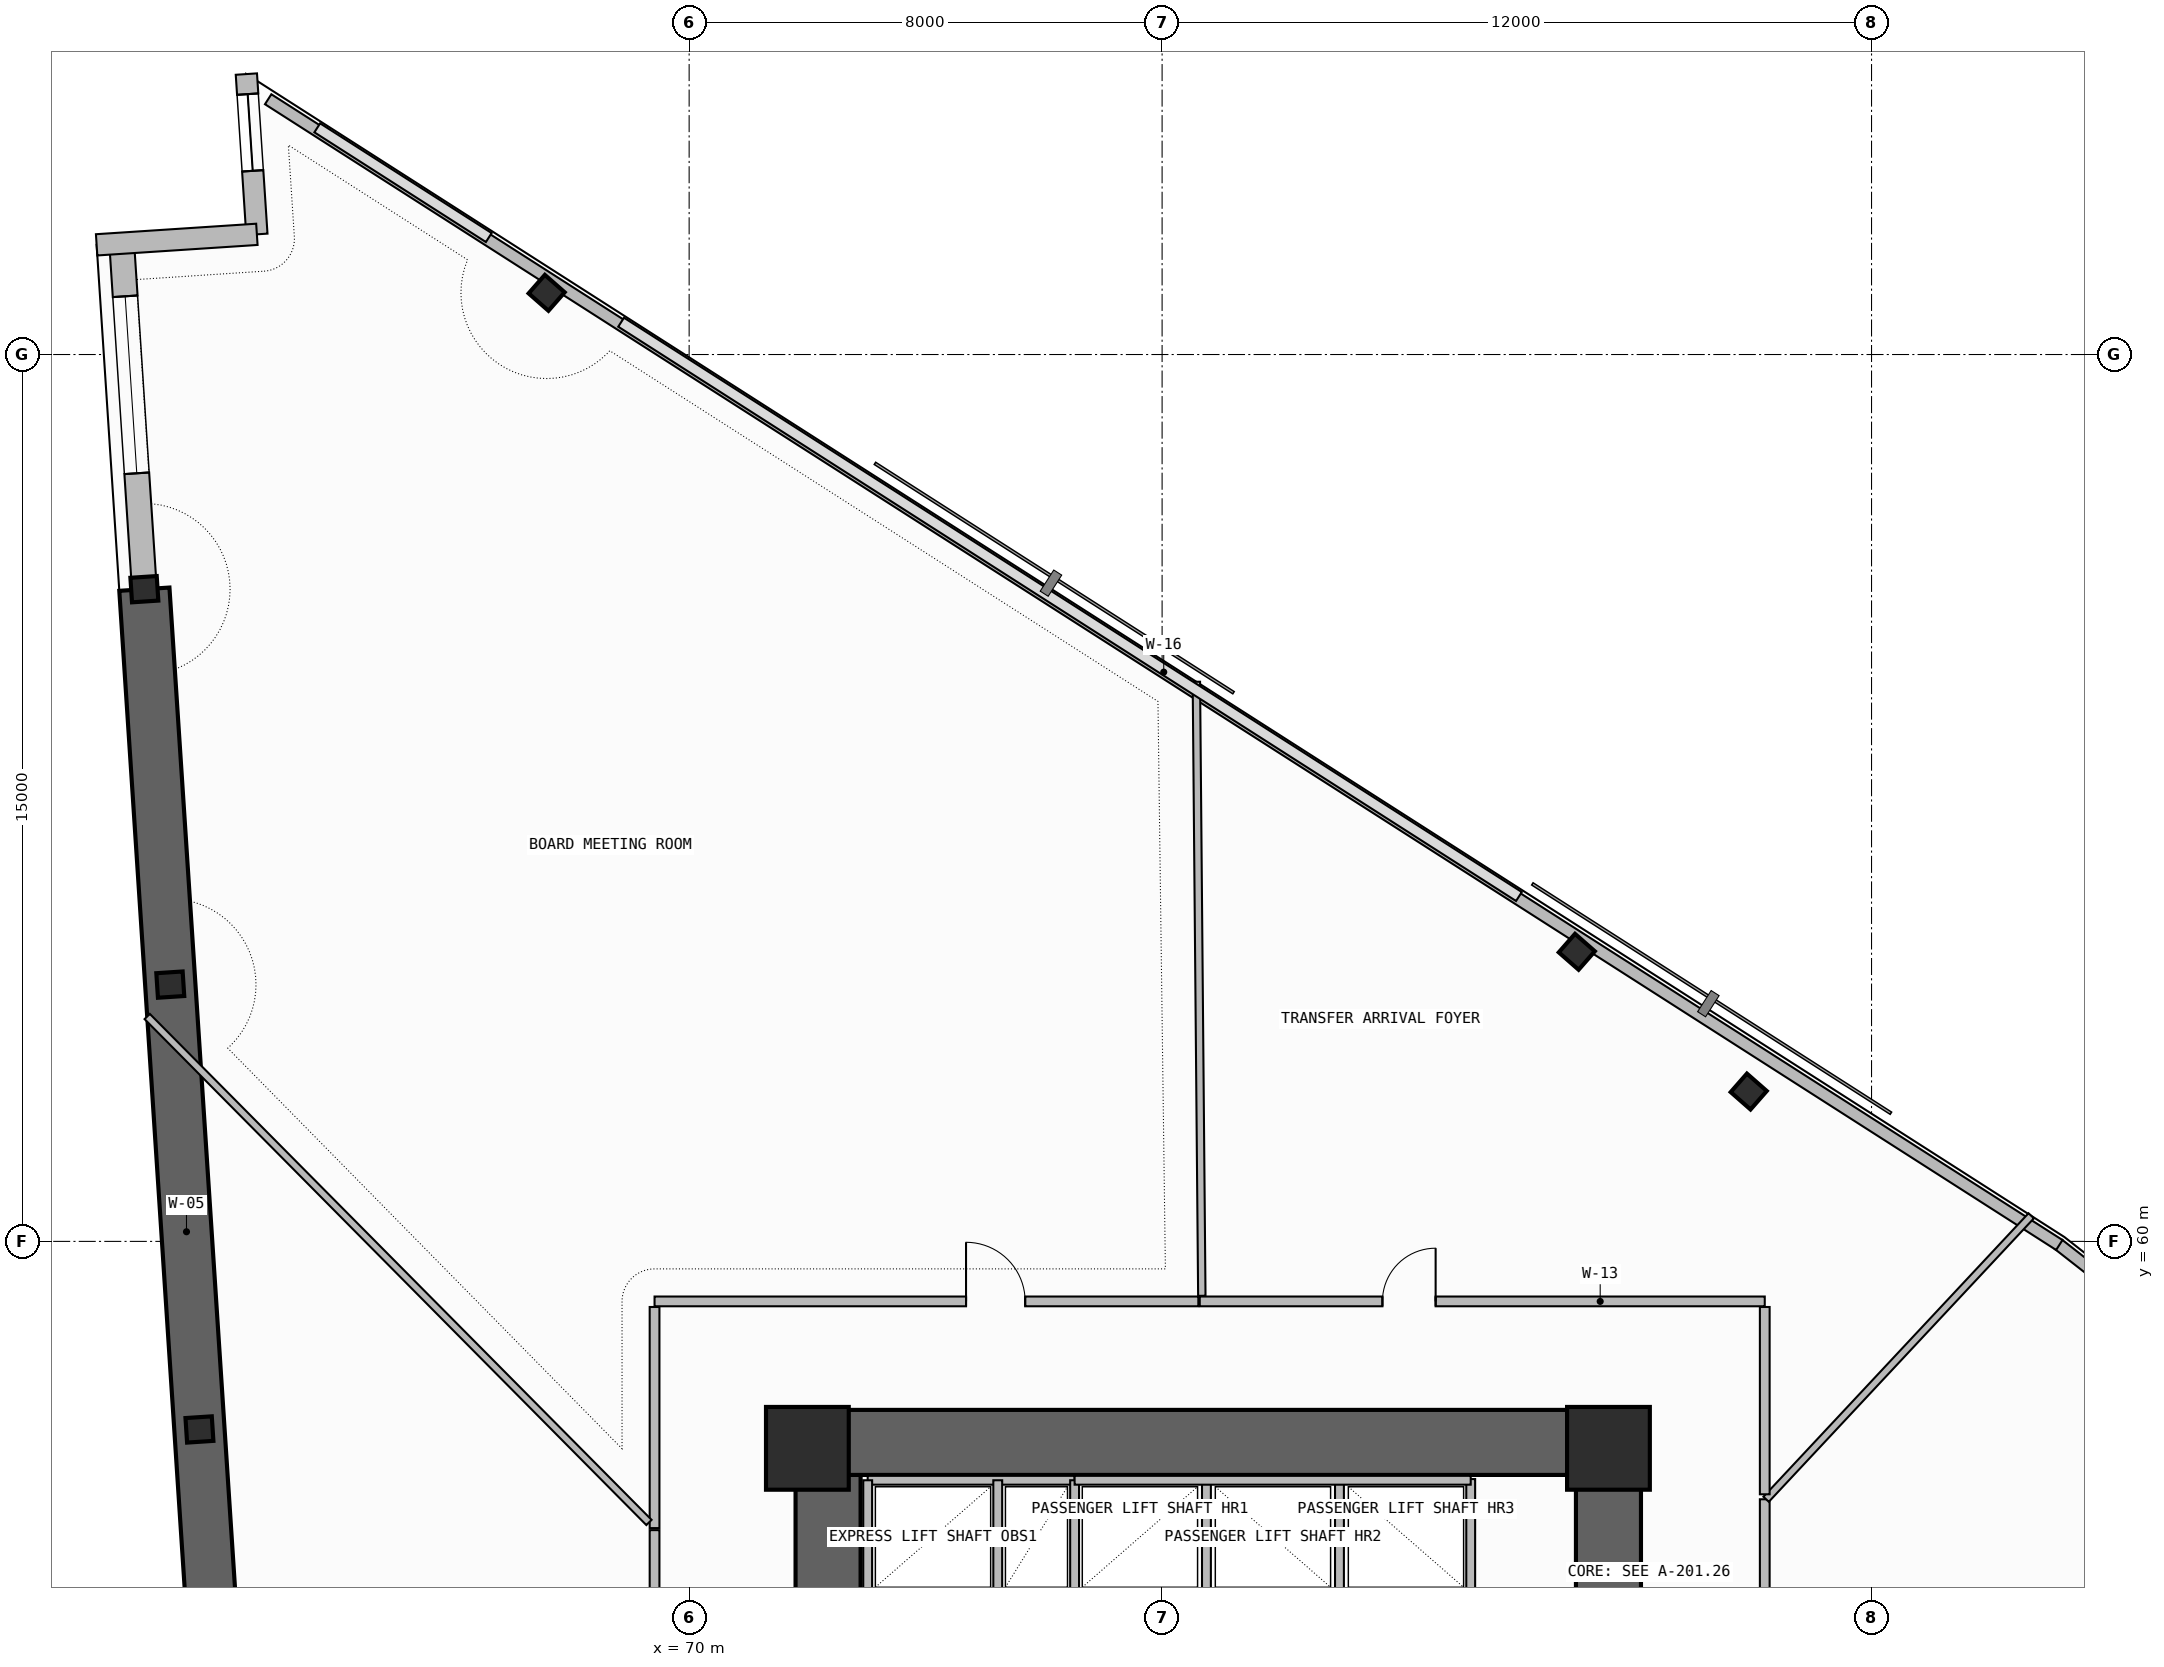
"""IFC4 building model, lengths in metres.
Left out: names, types, materials, properties, quantities, classifications, styles, units other than length and angle.
Written with IfcOpenShell. Run it as: python <this file> out.ifc"""

import sys

from ifc_helpers import new_model, si_unit, direction, frame, frame_2d, origin, origin_2d, place, context, subcontext, project, spatial, rectangle, i_section, extrude, element, fill, save


model = new_model("IFC4")
c1 = context("Model", 3, precision=1e-05, world=origin(), true_north=direction((0.0, 1.0)))
c2 = subcontext(c1, "Body", "Model", "MODEL_VIEW")
j1 = project(units=[si_unit("LENGTHUNIT", "METRE"), si_unit("PLANEANGLEUNIT", "RADIAN")], contexts=[c1])
p1 = place(None, origin())
s1 = spatial("IfcSite", under=j1, at=p1, CompositionType="ELEMENT")
p2 = place(p1, origin())
s2 = spatial("IfcBuilding", under=s1, at=p2, CompositionType="ELEMENT")
p3 = place(p2, frame((0.0, 0.0, 92.1)))
s3 = spatial("IfcBuildingStorey", under=s2, at=p3, CompositionType="ELEMENT", Elevation=92.1)
p4 = place(p3, frame((72.35, 43.35, -0.26), z_axis=(0.0, 0.0, 1.0), x_axis=(0.0, 1.0, 0.0)))
e1 = element("IfcWall", 1, at=p4, inside=s3, PredefinedType="SHEAR", context=c2, shape_type="SweptSolid", body=[
    extrude(rectangle(XDim=12.7, YDim=1.1, at=frame_2d((6.35, 0.0))), origin(), (0.0, 0.0, 1.0), 3.46),
])
p5 = place(p4, frame((1.35, 0.0, 0.26)))
e2 = element("IfcOpeningElement", 2, at=p5, cuts=e1, PredefinedType="OPENING", context=c2, shape_type="SweptSolid", body=[
    extrude(rectangle(XDim=1.2, YDim=2.2, at=frame_2d((0.6, 1.1))), frame((0.0, 0.56, 0.0), z_axis=(0.0, -1.0, 0.0), x_axis=(1.0, 0.0, 0.0)), (0.0, 0.0, 1.0), 1.12),
])
p6 = place(p3, frame((71.8, 56.6, -0.26), z_axis=(0.0, 0.0, 1.0), x_axis=(1.0, 0.0, 0.0)))
e3 = element("IfcWall", 3, at=p6, inside=s3, PredefinedType="SHEAR", context=c2, shape_type="SweptSolid", body=[
    extrude(rectangle(XDim=14.3, YDim=1.1, at=frame_2d((7.15, 0.0))), origin(), (0.0, 0.0, 1.0), 3.46),
])
p7 = place(p3, frame((85.55, 47.6, -0.26), z_axis=(0.0, 0.0, 1.0), x_axis=(0.0, 1.0, 0.0)))
e4 = element("IfcWall", 4, at=p7, inside=s3, PredefinedType="SHEAR", context=c2, shape_type="SweptSolid", body=[
    extrude(rectangle(XDim=8.45, YDim=1.1, at=frame_2d((4.225, 0.0))), origin(), (0.0, 0.0, 1.0), 3.46),
])
for number, where, z_axis, x_axis in (
    (5, (72.0, 56.5, 0.0), (0.0, 0.0, 1.0), (1.0, 0.0, 0.0)),
    (6, (85.55, 56.5, 0.0), (0.0, 0.0, 1.0), (1.0, 0.0, 0.0)),
):
    element("IfcColumn", number, at=place(p3, frame(where, z_axis=z_axis, x_axis=x_axis)), inside=s3, PredefinedType="COLUMN", context=c2, shape_type="SweptSolid", body=[
        extrude(rectangle(XDim=1.4, YDim=1.4, at=origin_2d()), origin(), (0.0, 0.0, 1.0), 3.6),
    ])
for number, where, z_axis, x_axis in (
    (7, (87.923, 62.534, 0.0), (0.0, 0.0, 1.0), (0.659, 0.752, 0.0)),
    (8, (85.015, 64.898, 0.0), (0.0, 0.0, 1.0), (0.659, 0.752, 0.0)),
    (9, (67.59, 76.043, 0.0), (0.0, 0.0, 1.0), (0.659, 0.752, 0.0)),
    (10, (60.785, 71.031, 0.0), (0.0, 0.0, 1.0), (-0.065, 0.998, 0.0)),
    (11, (61.224, 64.343, 0.0), (0.0, 0.0, 1.0), (-0.065, 0.998, 0.0)),
    (12, (61.717, 56.819, 0.0), (0.0, 0.0, 1.0), (-0.065, 0.998, 0.0)),
):
    element("IfcColumn", number, at=place(p3, frame(where, z_axis=z_axis, x_axis=x_axis)), inside=s3, PredefinedType="COLUMN", context=c2, shape_type="SweptSolid", body=[
        extrude(i_section(OverallWidth=0.416, OverallDepth=0.446, WebThickness=0.039, FlangeThickness=0.063, FilletRadius=0.015, at=origin_2d()), origin(), (0.0, 0.0, 1.0), 3.6),
    ])
p8 = place(p3, frame((60.402, 76.883, 0.0), z_axis=(0.0, 0.0, 1.0), x_axis=(0.065402662459, -0.997858953832, 0.0)))
e13 = element("IfcWall", 13, at=p8, inside=s3, PredefinedType="SOLIDWALL", context=c2, shape_type="SweptSolid", body=[
    extrude(rectangle(XDim=5.864, YDim=0.42, at=frame_2d((2.932, 0.0))), origin(), (0.0, 0.0, 1.0), 2.177),
])
p9 = place(p8, frame((0.9, 0.0, 1.197)))
e14 = element("IfcOpeningElement", 14, at=p9, cuts=e13, PredefinedType="OPENING", context=c2, shape_type="SweptSolid", body=[
    extrude(rectangle(XDim=3.0, YDim=0.9, at=frame_2d((1.5, 0.45))), frame((0.0, 0.22, 0.0), z_axis=(0.0, -1.0, 0.0), x_axis=(1.0, 0.0, 0.0)), (0.0, 0.0, 1.0), 0.44),
])
p10 = place(p3, frame((60.785, 71.031, -0.26), z_axis=(0.0, 0.0, 1.0), x_axis=(0.065409824833, -0.997858484363, 0.0)))
e15 = element("IfcWall", 15, at=p10, inside=s3, PredefinedType="SHEAR", context=c2, shape_type="SweptSolid", body=[
    extrude(rectangle(XDim=21.783, YDim=0.85, at=frame_2d((10.891, 0.0))), origin(), (0.0, 0.0, 1.0), 3.46),
])
p11 = place(p3, frame((62.511, 79.743, 0.0), z_axis=(0.0, 0.0, 1.0), x_axis=(0.065337885661, -0.997863197386, 0.0)))
e16 = element("IfcWall", 16, at=p11, inside=s3, PredefinedType="SOLIDWALL", context=c2, shape_type="SweptSolid", body=[
    extrude(rectangle(XDim=2.717, YDim=0.36, at=frame_2d((1.358, 0.0))), origin(), (0.0, 0.0, 1.0), 3.2),
])
p12 = place(p11, frame((0.34, 0.0, 0.45)))
e17 = element("IfcOpeningElement", 17, at=p12, cuts=e16, PredefinedType="OPENING", context=c2, shape_type="SweptSolid", body=[
    extrude(rectangle(XDim=1.3, YDim=2.4, at=frame_2d((0.65, 1.2))), frame((0.0, 0.19, 0.0), z_axis=(0.0, -1.0, 0.0), x_axis=(1.0, 0.0, 0.0)), (0.0, 0.0, 1.0), 0.38),
])
p13 = place(p3, frame((62.688, 77.033, 0.0), z_axis=(0.0, 0.0, 1.0), x_axis=(-0.99785694905, -0.065433242561, 0.0)))
e18 = element("IfcWall", 18, at=p13, inside=s3, PredefinedType="SOLIDWALL", context=c2, shape_type="SweptSolid", body=[
    extrude(rectangle(XDim=2.716, YDim=0.36, at=frame_2d((1.358, 0.0))), origin(), (0.0, 0.0, 1.0), 3.2),
])
p14 = place(p3, frame((121.476, 37.781, 0.0), z_axis=(0.0, 0.0, 1.0), x_axis=(-0.787385636484, 0.61646075257, 0.0)))
e19 = element("IfcWall", 19, at=p14, inside=s3, PredefinedType="PARAPET", context=c2, shape_type="SweptSolid", body=[
    extrude(rectangle(XDim=35.957, YDim=0.2, at=frame_2d((17.979, 0.0))), origin(), (0.0, 0.0, 1.0), 1.15),
])
p15 = place(p3, frame((93.176, 59.939, 0.0), z_axis=(0.0, 0.0, 1.0), x_axis=(-0.842412534527, 0.53883311115, 0.0)))
e20 = element("IfcWall", 20, at=p15, inside=s3, PredefinedType="PARAPET", context=c2, shape_type="SweptSolid", body=[
    extrude(rectangle(XDim=35.964, YDim=0.2, at=frame_2d((17.982, 0.0))), origin(), (0.0, 0.0, 1.0), 1.15),
])
p16 = place(p3, frame((73.02, 55.96, 0.0), z_axis=(0.0, 0.0, 1.0), x_axis=(1.0, 0.0, 0.0)))
e21 = element("IfcWall", 21, at=p16, inside=s3, PredefinedType="SOLIDWALL", context=c2, shape_type="SweptSolid", body=[
    extrude(rectangle(XDim=3.5, YDim=0.15, at=frame_2d((1.75, 0.0))), origin(), (0.0, 0.0, 1.0), 3.2),
])
p17 = place(p3, frame((73.02, 54.02, 0.0), z_axis=(0.0, 0.0, 1.0), x_axis=(0.0, 1.0, 0.0)))
e22 = element("IfcWall", 22, at=p17, inside=s3, PredefinedType="PLUMBINGWALL", context=c2, shape_type="SweptSolid", body=[
    extrude(rectangle(XDim=1.94, YDim=0.15, at=frame_2d((0.97, 0.0))), origin(), (0.0, 0.0, 1.0), 3.2),
])
p18 = place(p3, frame((76.52, 54.02, 0.0), z_axis=(0.0, 0.0, 1.0), x_axis=(0.0, 1.0, 0.0)))
e23 = element("IfcWall", 23, at=p18, inside=s3, PredefinedType="SOLIDWALL", context=c2, shape_type="SweptSolid", body=[
    extrude(rectangle(XDim=1.94, YDim=0.15, at=frame_2d((0.97, 0.0))), origin(), (0.0, 0.0, 1.0), 3.2),
])
p19 = place(p3, frame((75.22, 54.02, 0.0), z_axis=(0.0, 0.0, 1.0), x_axis=(0.0, 1.0, 0.0)))
e24 = element("IfcWall", 24, at=p19, inside=s3, PredefinedType="PLUMBINGWALL", context=c2, shape_type="SweptSolid", body=[
    extrude(rectangle(XDim=1.94, YDim=0.15, at=frame_2d((0.97, 0.0))), origin(), (0.0, 0.0, 1.0), 3.2),
])
for number, where, z_axis, x_axis in (
    (25, (78.75, 54.02, 0.0), (0.0, 0.0, 1.0), (0.0, 1.0, 0.0)),
    (26, (81.0, 54.02, 0.0), (0.0, 0.0, 1.0), (0.0, 1.0, 0.0)),
):
    element("IfcWall", number, at=place(p3, frame(where, z_axis=z_axis, x_axis=x_axis)), inside=s3, PredefinedType="PLUMBINGWALL", context=c2, shape_type="SweptSolid", body=[
        extrude(rectangle(XDim=1.96, YDim=0.15, at=frame_2d((0.98, 0.0))), origin(), (0.0, 0.0, 1.0), 3.2),
    ])
p20 = place(p3, frame((83.22, 54.02, 0.0), z_axis=(0.0, 0.0, 1.0), x_axis=(0.0, 1.0, 0.0)))
e27 = element("IfcWall", 27, at=p20, inside=s3, PredefinedType="SOLIDWALL", context=c2, shape_type="SweptSolid", body=[
    extrude(rectangle(XDim=1.96, YDim=0.15, at=frame_2d((0.98, 0.0))), origin(), (0.0, 0.0, 1.0), 3.2),
])
p21 = place(p3, frame((76.52, 55.96, 0.0), z_axis=(0.0, 0.0, 1.0), x_axis=(1.0, 0.0, 0.0)))
e28 = element("IfcWall", 28, at=p21, inside=s3, PredefinedType="SOLIDWALL", context=c2, shape_type="SweptSolid", body=[
    extrude(rectangle(XDim=6.7, YDim=0.15, at=frame_2d((3.35, 0.0))), origin(), (0.0, 0.0, 1.0), 3.2),
])
p22 = place(p3, frame((88.194, 46.129, 0.0), z_axis=(0.0, 0.0, 1.0), x_axis=(0.0, 1.0, 0.0)))
e29 = element("IfcWall", 29, at=p22, inside=s3, PredefinedType="PARTITIONING", context=c2, shape_type="SweptSolid", body=[
    extrude(rectangle(XDim=9.51, YDim=0.165, at=frame_2d((4.755, 0.0))), origin(), (0.0, 0.0, 1.0), 3.2),
])
p23 = place(p22, frame((4.255, 0.0, 0.0)))
e30 = element("IfcOpeningElement", 30, at=p23, cuts=e29, PredefinedType="OPENING", context=c2, shape_type="SweptSolid", body=[
    extrude(rectangle(XDim=1.0, YDim=2.2, at=frame_2d((0.5, 1.1))), frame((0.0, 0.093, 0.0), z_axis=(0.0, -1.0, 0.0), x_axis=(1.0, 0.0, 0.0)), (0.0, 0.0, 1.0), 0.185),
])
p24 = place(p3, frame((88.217, 55.638, 0.0), z_axis=(0.0, 0.0, 1.0), x_axis=(0.683038758591, 0.730382128932, 0.0)))
e31 = element("IfcWall", 31, at=p24, inside=s3, PredefinedType="PARTITIONING", context=c2, shape_type="SweptSolid", body=[
    extrude(rectangle(XDim=6.565, YDim=0.125, at=frame_2d((3.282, 0.0))), origin(), (0.0, 0.0, 1.0), 2.177),
])
p25 = place(p3, frame((88.194, 58.985, 0.0), z_axis=(0.0, 0.0, 1.0), x_axis=(-1.0, 0.0, 0.0)))
e32 = element("IfcWall", 32, at=p25, inside=s3, PredefinedType="PARTITIONING", context=c2, shape_type="SweptSolid", body=[
    extrude(rectangle(XDim=9.557, YDim=0.165, at=frame_2d((4.778, 0.0))), origin(), (0.0, 0.0, 1.0), 2.177),
])
p26 = place(p25, frame((5.567, 0.0, 0.0)))
e33 = element("IfcOpeningElement", 33, at=p26, cuts=e32, PredefinedType="OPENING", context=c2, shape_type="SweptSolid", body=[
    extrude(rectangle(XDim=0.9, YDim=2.1, at=frame_2d((0.45, 1.05))), frame((0.0, 0.093, 0.0), z_axis=(0.0, -1.0, 0.0), x_axis=(1.0, 0.0, 0.0)), (0.0, 0.0, 1.0), 0.185),
])
p27 = place(p3, frame((88.194, 55.723, 0.0), z_axis=(0.0, 0.0, 1.0), x_axis=(0.0, 1.0, 0.0)))
e34 = element("IfcWall", 34, at=p27, inside=s3, PredefinedType="PARTITIONING", context=c2, shape_type="SweptSolid", body=[
    extrude(rectangle(XDim=3.168, YDim=0.165, at=frame_2d((1.584, 0.0))), origin(), (0.0, 0.0, 1.0), 2.177),
])
p28 = place(p3, frame((78.672, 59.08, 0.0), z_axis=(0.0, 0.0, 1.0), x_axis=(-0.00888561267, 0.999960522164, 0.0)))
e35 = element("IfcWall", 35, at=p28, inside=s3, PredefinedType="PARTITIONING", context=c2, shape_type="SweptSolid", body=[
    extrude(rectangle(XDim=10.386, YDim=0.125, at=frame_2d((5.193, 0.0))), origin(), (0.0, 0.0, 1.0), 3.2),
])
p29 = place(p3, frame((78.613, 58.985, 0.0), z_axis=(0.0, 0.0, 1.0), x_axis=(-1.0, 0.0, 0.0)))
e36 = element("IfcWall", 36, at=p29, inside=s3, PredefinedType="PARTITIONING", context=c2, shape_type="SweptSolid", body=[
    extrude(rectangle(XDim=9.198, YDim=0.165, at=frame_2d((4.599, 0.0))), origin(), (0.0, 0.0, 1.0), 3.2),
])
p30 = place(p29, frame((2.929, 0.0, 0.0)))
e37 = element("IfcOpeningElement", 37, at=p30, cuts=e36, PredefinedType="OPENING", context=c2, shape_type="SweptSolid", body=[
    extrude(rectangle(XDim=1.0, YDim=2.2, at=frame_2d((0.5, 1.1))), frame((0.0, 0.093, 0.0), z_axis=(0.0, -1.0, 0.0), x_axis=(1.0, 0.0, 0.0)), (0.0, 0.0, 1.0), 0.185),
])
p31 = place(p3, frame((69.415, 58.89, 0.0), z_axis=(0.0, 0.0, 1.0), x_axis=(0.0, -1.0, 0.0)))
e38 = element("IfcWall", 38, at=p31, inside=s3, PredefinedType="PARTITIONING", context=c2, shape_type="SweptSolid", body=[
    extrude(rectangle(XDim=3.74, YDim=0.165, at=frame_2d((1.87, 0.0))), origin(), (0.0, 0.0, 1.0), 2.177),
])
p32 = place(p3, frame((69.321, 55.246, 0.0), z_axis=(0.0, 0.0, 1.0), x_axis=(-0.704183883147, 0.710017646763, 0.0)))
e39 = element("IfcWall", 39, at=p32, inside=s3, PredefinedType="PARTITIONING", context=c2, shape_type="SweptSolid", body=[
    extrude(rectangle(XDim=12.053, YDim=0.125, at=frame_2d((6.026, 0.0))), origin(), (0.0, 0.0, 1.0), 2.177),
])
p33 = place(p3, frame((69.415, 55.116, 0.0), z_axis=(0.0, 0.0, 1.0), x_axis=(0.0, -1.0, 0.0)))
e40 = element("IfcWall", 40, at=p33, inside=s3, PredefinedType="PARTITIONING", context=c2, shape_type="SweptSolid", body=[
    extrude(rectangle(XDim=9.174, YDim=0.165, at=frame_2d((4.587, 0.0))), origin(), (0.0, 0.0, 1.0), 2.177),
])
p34 = place(p33, frame((5.318, 0.0, 0.0)))
e41 = element("IfcOpeningElement", 41, at=p34, cuts=e40, PredefinedType="OPENING", context=c2, shape_type="SweptSolid", body=[
    extrude(rectangle(XDim=0.9, YDim=2.1, at=frame_2d((0.45, 1.05))), frame((0.0, 0.093, 0.0), z_axis=(0.0, -1.0, 0.0), x_axis=(1.0, 0.0, 0.0)), (0.0, 0.0, 1.0), 0.185),
])
p35 = place(p9, origin())
e42 = element("IfcWindow", 42, at=p35, inside=s3, PartitioningType="SINGLE_PANEL", PredefinedType="WINDOW", context=c2, shape_type="SweptSolid", body=[
    extrude(rectangle(XDim=3.0, YDim=0.9, at=frame_2d((1.5, 0.45))), frame((0.0, 0.03, 0.0), z_axis=(0.0, -1.0, 0.0), x_axis=(1.0, 0.0, 0.0)), (0.0, 0.0, 1.0), 0.06),
])
fill(e14, e42)
p36 = place(p12, origin())
e43 = element("IfcWindow", 43, at=p36, inside=s3, PartitioningType="SINGLE_PANEL", PredefinedType="WINDOW", context=c2, shape_type="SweptSolid", body=[
    extrude(rectangle(XDim=1.3, YDim=2.4, at=frame_2d((0.65, 1.2))), frame((0.0, 0.03, 0.0), z_axis=(0.0, -1.0, 0.0), x_axis=(1.0, 0.0, 0.0)), (0.0, 0.0, 1.0), 0.06),
])
fill(e17, e43)
p37 = place(p26, frame((0.9, 0.0, 0.0), z_axis=(0.0, 0.0, 1.0), x_axis=(-1.0, 0.0, 0.0)))
e44 = element("IfcDoor", 44, at=p37, inside=s3, OperationType="SINGLE_SWING_RIGHT", PredefinedType="DOOR", context=c2, shape_type="SweptSolid", body=[
    extrude(rectangle(XDim=0.9, YDim=2.1, at=frame_2d((0.45, 1.05))), frame((0.0, 0.025, 0.0), z_axis=(0.0, -1.0, 0.0), x_axis=(1.0, 0.0, 0.0)), (0.0, 0.0, 1.0), 0.05),
])
fill(e33, e44)
p38 = place(p30, frame((1.0, 0.0, 0.0), z_axis=(0.0, 0.0, 1.0), x_axis=(-1.0, 0.0, 0.0)))
e45 = element("IfcDoor", 45, at=p38, inside=s3, OperationType="SINGLE_SWING_LEFT", PredefinedType="DOOR", context=c2, shape_type="SweptSolid", body=[
    extrude(rectangle(XDim=1.0, YDim=2.2, at=frame_2d((0.5, 1.1))), frame((0.0, 0.025, 0.0), z_axis=(0.0, -1.0, 0.0), x_axis=(1.0, 0.0, 0.0)), (0.0, 0.0, 1.0), 0.05),
])
fill(e37, e45)
save(model, sys.argv[1])
